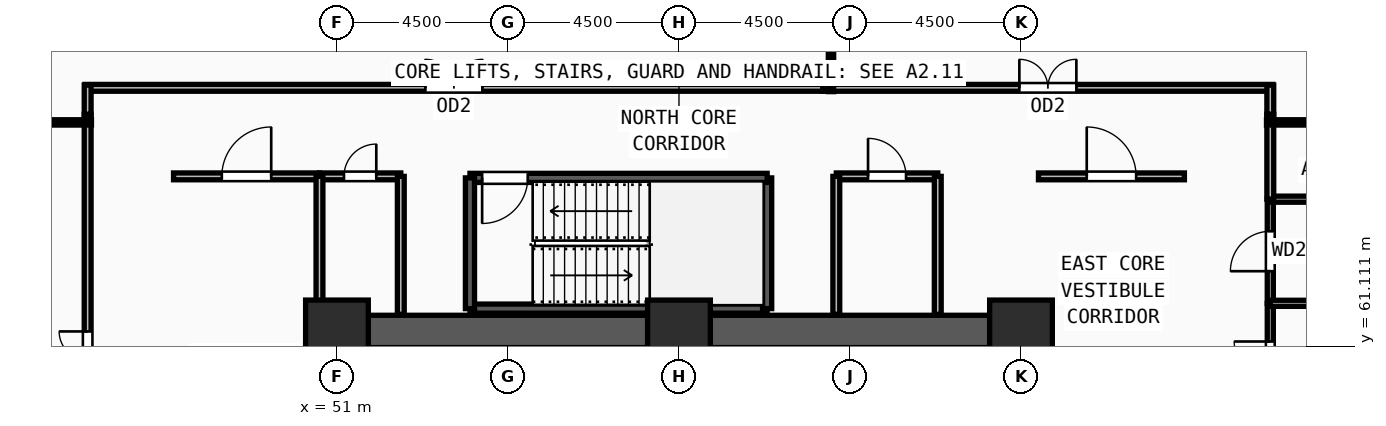
"""IFC4 building model, lengths in metres.
Left out: names, types, materials, properties, quantities, classifications, styles, units other than length and angle.
Written with IfcOpenShell. Run it as: python <this file> out.ifc"""

import sys

from ifc_helpers import new_model, si_unit, direction, frame, frame_2d, origin, origin_2d, place, context, subcontext, project, spatial, rectangle, extrude, source, transform, mapped, element, fill, save


model = new_model("IFC4")
c1 = context("Model", 3, precision=1e-05, world=origin(), true_north=direction((0.0, 1.0)))
c2 = subcontext(c1, "Body", "Model", "MODEL_VIEW")
j1 = project(units=[si_unit("LENGTHUNIT", "METRE"), si_unit("PLANEANGLEUNIT", "RADIAN")], contexts=[c1])
p1 = place(None, origin())
s1 = spatial("IfcSite", under=j1, at=p1, CompositionType="ELEMENT")
p2 = place(p1, origin())
s2 = spatial("IfcBuilding", under=s1, at=p2, CompositionType="ELEMENT")
p3 = place(p2, frame((0.0, 0.0, 63.0)))
s3 = spatial("IfcBuildingStorey", under=s2, at=p3, CompositionType="ELEMENT", Elevation=63.0)
m1 = source(origin(), c2, "Body", "SweptSolid", [
    extrude(rectangle(XDim=1.65, YDim=1.65, at=origin_2d()), origin(), (0.0, 0.0, 1.0), 3.75),
])
for number, where, z_axis, x_axis in (
    (1, (69.0, 61.5, 0.0), (0.0, 0.0, 1.0), (1.0, 0.0, 0.0)),
    (2, (60.0, 61.5, 0.0), (0.0, 0.0, 1.0), (1.0, 0.0, 0.0)),
    (3, (51.0, 61.5, 0.0), (0.0, 0.0, 1.0), (1.0, 0.0, 0.0)),
):
    element("IfcColumn", number, at=place(p3, frame(where, z_axis=z_axis, x_axis=x_axis)), inside=s3, PredefinedType="COLUMN", context=c2, shape_type="MappedRepresentation", body=[
        mapped(m1, transform((0.0, 0.0, 0.0), x_axis=(1.0, 0.0, 0.0), y_axis=(0.0, 1.0, 0.0), z_axis=(0.0, 0.0, 1.0), scale=1.0)),
    ])
for number, where, z_axis, x_axis in (
    (4, (51.825, 61.5, 0.0), (0.0, 0.0, 1.0), (1.0, 0.0, 0.0)),
    (5, (60.825, 61.5, 0.0), (0.0, 0.0, 1.0), (1.0, 0.0, 0.0)),
):
    element("IfcWall", number, at=place(p3, frame(where, z_axis=z_axis, x_axis=x_axis)), inside=s3, PredefinedType="SHEAR", context=c2, shape_type="SweptSolid", body=[
        extrude(rectangle(XDim=7.35, YDim=0.85, at=frame_2d((3.675, 0.0))), origin(), (0.0, 0.0, 1.0), 3.57),
    ])
p4 = place(p3, frame((54.5, 62.1, 0.0), z_axis=(0.0, 0.0, 1.0), x_axis=(1.0, 0.0, 0.0)))
e6 = element("IfcWall", 6, at=p4, inside=s3, PredefinedType="SOLIDWALL", context=c2, shape_type="SweptSolid", body=[
    extrude(rectangle(XDim=7.82, YDim=0.24, at=frame_2d((3.91, 0.0))), origin(), (0.0, 0.0, 1.0), 3.57),
])
p5 = place(p3, frame((62.32, 62.1, 0.0), z_axis=(0.0, 0.0, 1.0), x_axis=(0.0, 1.0, 0.0)))
e7 = element("IfcWall", 7, at=p5, inside=s3, PredefinedType="SOLIDWALL", context=c2, shape_type="SweptSolid", body=[
    extrude(rectangle(XDim=3.44, YDim=0.24, at=frame_2d((1.72, 0.0))), origin(), (0.0, 0.0, 1.0), 3.57),
])
p6 = place(p3, frame((62.32, 65.54, 0.0), z_axis=(0.0, 0.0, 1.0), x_axis=(-1.0, 0.0, 0.0)))
e8 = element("IfcWall", 8, at=p6, inside=s3, PredefinedType="SOLIDWALL", context=c2, shape_type="SweptSolid", body=[
    extrude(rectangle(XDim=7.82, YDim=0.24, at=frame_2d((3.91, 0.0))), origin(), (0.0, 0.0, 1.0), 3.57),
])
m2 = source(origin(), c2, "Body", "SweptSolid", [
    extrude(rectangle(XDim=1.2, YDim=2.2, at=frame_2d((0.6, 1.1))), frame((0.0, 0.13, 0.0), z_axis=(0.0, -1.0, 0.0), x_axis=(1.0, 0.0, 0.0)), (0.0, 0.0, 1.0), 0.26),
])
p7 = place(p6, frame((6.3, 0.0, 0.0)))
e9 = element("IfcOpeningElement", 9, at=p7, cuts=e8, PredefinedType="OPENING", context=c2, shape_type="MappedRepresentation", body=[
    mapped(m2, transform((0.0, 0.0, 0.0), x_axis=(1.0, 0.0, 0.0), y_axis=(0.0, 1.0, 0.0), z_axis=(0.0, 0.0, 1.0), scale=1.0)),
])
p8 = place(p3, frame((54.5, 65.54, 0.0), z_axis=(0.0, 0.0, 1.0), x_axis=(0.0, -1.0, 0.0)))
e10 = element("IfcWall", 10, at=p8, inside=s3, PredefinedType="SOLIDWALL", context=c2, shape_type="SweptSolid", body=[
    extrude(rectangle(XDim=3.44, YDim=0.24, at=frame_2d((1.72, 0.0))), origin(), (0.0, 0.0, 1.0), 3.57),
])
p9 = place(p3, frame((75.56, 59.28, 0.0), z_axis=(0.0, 0.0, 1.0), x_axis=(0.0, 1.0, 0.0)))
e11 = element("IfcWall", 11, at=p9, inside=s3, PredefinedType="PARTITIONING", context=c2, shape_type="SweptSolid", body=[
    extrude(rectangle(XDim=2.96, YDim=0.16, at=frame_2d((1.48, 0.0))), origin(), (0.0, 0.0, 1.0), 3.57),
])
m3 = source(origin(), c2, "Body", "SweptSolid", [
    extrude(rectangle(XDim=0.95, YDim=2.15, at=frame_2d((0.475, 1.075))), frame((0.0, 0.09, 0.0), z_axis=(0.0, -1.0, 0.0), x_axis=(1.0, 0.0, 0.0)), (0.0, 0.0, 1.0), 0.18),
])
p10 = place(p9, frame((1.005, 0.0, 0.0)))
e12 = element("IfcOpeningElement", 12, at=p10, cuts=e11, PredefinedType="OPENING", context=c2, shape_type="MappedRepresentation", body=[
    mapped(m3, transform((0.0, 0.0, 0.0), x_axis=(1.0, 0.0, 0.0), y_axis=(0.0, 1.0, 0.0), z_axis=(0.0, 0.0, 1.0), scale=1.0)),
])
p11 = place(p3, frame((75.56, 62.24, 0.0), z_axis=(0.0, 0.0, 1.0), x_axis=(0.0, 1.0, 0.0)))
e13 = element("IfcWall", 13, at=p11, inside=s3, PredefinedType="PARTITIONING", context=c2, shape_type="SweptSolid", body=[
    extrude(rectangle(XDim=2.74, YDim=0.16, at=frame_2d((1.37, 0.0))), origin(), (0.0, 0.0, 1.0), 3.57),
])
m4 = source(origin(), c2, "Body", "SweptSolid", [
    extrude(rectangle(XDim=1.05, YDim=2.15, at=frame_2d((0.525, 1.075))), frame((0.0, 0.09, 0.0), z_axis=(0.0, -1.0, 0.0), x_axis=(1.0, 0.0, 0.0)), (0.0, 0.0, 1.0), 0.18),
])
p12 = place(p11, frame((0.845, 0.0, 0.0)))
e14 = element("IfcOpeningElement", 14, at=p12, cuts=e13, PredefinedType="OPENING", context=c2, shape_type="MappedRepresentation", body=[
    mapped(m4, transform((0.0, 0.0, 0.0), x_axis=(1.0, 0.0, 0.0), y_axis=(0.0, 1.0, 0.0), z_axis=(0.0, 0.0, 1.0), scale=1.0)),
])
p13 = place(p3, frame((50.54, 65.58, 0.0), z_axis=(0.0, 0.0, 1.0), x_axis=(1.0, 0.0, 0.0)))
e15 = element("IfcWall", 15, at=p13, inside=s3, PredefinedType="PARTITIONING", context=c2, shape_type="SweptSolid", body=[
    extrude(rectangle(XDim=2.14, YDim=0.18, at=frame_2d((1.07, 0.0))), origin(), (0.0, 0.0, 1.0), 3.57),
])
m5 = source(origin(), c2, "Body", "SweptSolid", [
    extrude(rectangle(XDim=0.85, YDim=2.1, at=frame_2d((0.425, 1.05))), frame((0.0, 0.1, 0.0), z_axis=(0.0, -1.0, 0.0), x_axis=(1.0, 0.0, 0.0)), (0.0, 0.0, 1.0), 0.2),
])
p14 = place(p13, frame((0.645, 0.0, 0.0)))
e16 = element("IfcOpeningElement", 16, at=p14, cuts=e15, PredefinedType="OPENING", context=c2, shape_type="MappedRepresentation", body=[
    mapped(m5, transform((0.0, 0.0, 0.0), x_axis=(1.0, 0.0, 0.0), y_axis=(0.0, 1.0, 0.0), z_axis=(0.0, 0.0, 1.0), scale=1.0)),
])
p15 = place(p3, frame((64.14, 65.58, 0.0), z_axis=(0.0, 0.0, 1.0), x_axis=(1.0, 0.0, 0.0)))
e17 = element("IfcWall", 17, at=p15, inside=s3, PredefinedType="PARTITIONING", context=c2, shape_type="SweptSolid", body=[
    extrude(rectangle(XDim=2.67, YDim=0.18, at=frame_2d((1.335, 0.0))), origin(), (0.0, 0.0, 1.0), 3.57),
])
m6 = source(origin(), c2, "Body", "SweptSolid", [
    extrude(rectangle(XDim=1.0, YDim=2.2, at=frame_2d((0.5, 1.1))), frame((0.0, 0.1, 0.0), z_axis=(0.0, -1.0, 0.0), x_axis=(1.0, 0.0, 0.0)), (0.0, 0.0, 1.0), 0.2),
])
p16 = place(p15, frame((0.835, 0.0, 0.0)))
e18 = element("IfcOpeningElement", 18, at=p16, cuts=e17, PredefinedType="OPENING", context=c2, shape_type="MappedRepresentation", body=[
    mapped(m6, transform((0.0, 0.0, 0.0), x_axis=(1.0, 0.0, 0.0), y_axis=(0.0, 1.0, 0.0), z_axis=(0.0, 0.0, 1.0), scale=1.0)),
])
p17 = place(p3, frame((46.7, 65.58, 0.0), z_axis=(0.0, 0.0, 1.0), x_axis=(1.0, 0.0, 0.0)))
e19 = element("IfcWall", 19, at=p17, inside=s3, PredefinedType="PARTITIONING", context=c2, shape_type="SweptSolid", body=[
    extrude(rectangle(XDim=3.84, YDim=0.18, at=frame_2d((1.92, 0.0))), origin(), (0.0, 0.0, 1.0), 3.57),
])
m7 = source(origin(), c2, "Body", "SweptSolid", [
    extrude(rectangle(XDim=1.3, YDim=2.2, at=frame_2d((0.65, 1.1))), frame((0.0, 0.1, 0.0), z_axis=(0.0, -1.0, 0.0), x_axis=(1.0, 0.0, 0.0)), (0.0, 0.0, 1.0), 0.2),
])
p18 = place(p17, frame((1.27, 0.0, 0.0)))
e20 = element("IfcOpeningElement", 20, at=p18, cuts=e19, PredefinedType="OPENING", context=c2, shape_type="MappedRepresentation", body=[
    mapped(m7, transform((0.0, 0.0, 0.0), x_axis=(1.0, 0.0, 0.0), y_axis=(0.0, 1.0, 0.0), z_axis=(0.0, 0.0, 1.0), scale=1.0)),
])
p19 = place(p3, frame((69.46, 65.58, 0.0), z_axis=(0.0, 0.0, 1.0), x_axis=(1.0, 0.0, 0.0)))
e21 = element("IfcWall", 21, at=p19, inside=s3, PredefinedType="PARTITIONING", context=c2, shape_type="SweptSolid", body=[
    extrude(rectangle(XDim=3.84, YDim=0.18, at=frame_2d((1.92, 0.0))), origin(), (0.0, 0.0, 1.0), 3.57),
])
p20 = place(p19, frame((1.27, 0.0, 0.0)))
e22 = element("IfcOpeningElement", 22, at=p20, cuts=e21, PredefinedType="OPENING", context=c2, shape_type="MappedRepresentation", body=[
    mapped(m7, transform((0.0, 0.0, 0.0), x_axis=(1.0, 0.0, 0.0), y_axis=(0.0, 1.0, 0.0), z_axis=(0.0, 0.0, 1.0), scale=1.0)),
])
p21 = place(p3, frame((63.785, 67.91, 0.0), z_axis=(0.0, 0.0, 1.0), x_axis=(1.0, 0.0, 0.0)))
e23 = element("IfcWall", 23, at=p21, inside=s3, PredefinedType="PARTITIONING", context=c2, shape_type="SweptSolid", body=[
    extrude(rectangle(XDim=11.845, YDim=0.18, at=frame_2d((5.922, 0.0))), origin(), (0.0, 0.0, 1.0), 3.57),
])
m8 = source(origin(), c2, "Body", "SweptSolid", [
    extrude(rectangle(XDim=1.5, YDim=2.2, at=frame_2d((0.75, 1.1))), frame((0.0, 0.1, 0.0), z_axis=(0.0, -1.0, 0.0), x_axis=(1.0, 0.0, 0.0)), (0.0, 0.0, 1.0), 0.2),
])
p22 = place(p21, frame((5.172, 0.0, 0.0)))
e24 = element("IfcOpeningElement", 24, at=p22, cuts=e23, PredefinedType="OPENING", context=c2, shape_type="MappedRepresentation", body=[
    mapped(m8, transform((0.0, 0.0, 0.0), x_axis=(1.0, 0.0, 0.0), y_axis=(0.0, 1.0, 0.0), z_axis=(0.0, 0.0, 1.0), scale=1.0)),
])
p23 = place(p3, frame((44.37, 67.91, 0.0), z_axis=(0.0, 0.0, 1.0), x_axis=(1.0, 0.0, 0.0)))
e25 = element("IfcWall", 25, at=p23, inside=s3, PredefinedType="PARTITIONING", context=c2, shape_type="SweptSolid", body=[
    extrude(rectangle(XDim=19.415, YDim=0.18, at=frame_2d((9.708, 0.0))), origin(), (0.0, 0.0, 1.0), 3.57),
])
p24 = place(p23, frame((8.957, 0.0, 0.0)))
e26 = element("IfcOpeningElement", 26, at=p24, cuts=e25, PredefinedType="OPENING", context=c2, shape_type="MappedRepresentation", body=[
    mapped(m8, transform((0.0, 0.0, 0.0), x_axis=(1.0, 0.0, 0.0), y_axis=(0.0, 1.0, 0.0), z_axis=(0.0, 0.0, 1.0), scale=1.0)),
])
p25 = place(p3, frame((44.44, 54.285, 0.0), z_axis=(0.0, 0.0, 1.0), x_axis=(0.0, 1.0, 0.0)))
e27 = element("IfcWall", 27, at=p25, inside=s3, PredefinedType="PARTITIONING", context=c2, shape_type="SweptSolid", body=[
    extrude(rectangle(XDim=12.93, YDim=0.18, at=frame_2d((6.465, 0.0))), origin(), (0.0, 0.0, 1.0), 3.57),
])
p26 = place(p25, frame((5.715, 0.0, 0.0)))
e28 = element("IfcOpeningElement", 28, at=p26, cuts=e27, PredefinedType="OPENING", context=c2, shape_type="MappedRepresentation", body=[
    mapped(m8, transform((0.0, 0.0, 0.0), x_axis=(1.0, 0.0, 0.0), y_axis=(0.0, 1.0, 0.0), z_axis=(0.0, 0.0, 1.0), scale=1.0)),
])
for number, where, z_axis, x_axis in (
    (29, (75.56, 62.24, 0.0), (0.0, 0.0, 1.0), (1.0, 0.0, 0.0)),
    (30, (75.56, 64.98, 0.0), (0.0, 0.0, 1.0), (1.0, 0.0, 0.0)),
):
    element("IfcWall", number, at=place(p3, frame(where, z_axis=z_axis, x_axis=x_axis)), inside=s3, PredefinedType="PARTITIONING", context=c2, shape_type="SweptSolid", body=[
        extrude(rectangle(XDim=4.46, YDim=0.16, at=frame_2d((2.23, 0.0))), origin(), (0.0, 0.0, 1.0), 3.57),
    ])
for number, where, z_axis, x_axis in (
    (31, (50.54, 61.95, 0.0), (0.0, 0.0, 1.0), (0.0, 1.0, 0.0)),
    (32, (52.68, 61.95, 0.0), (0.0, 0.0, 1.0), (0.0, 1.0, 0.0)),
    (33, (64.14, 61.95, 0.0), (0.0, 0.0, 1.0), (0.0, 1.0, 0.0)),
    (34, (66.81, 61.95, 0.0), (0.0, 0.0, 1.0), (0.0, 1.0, 0.0)),
):
    element("IfcWall", number, at=place(p3, frame(where, z_axis=z_axis, x_axis=x_axis)), inside=s3, PredefinedType="PARTITIONING", context=c2, shape_type="SweptSolid", body=[
        extrude(rectangle(XDim=3.63, YDim=0.18, at=frame_2d((1.815, 0.0))), origin(), (0.0, 0.0, 1.0), 3.57),
    ])
p27 = place(p3, frame((75.56, 67.215, 0.0), z_axis=(0.0, 0.0, 1.0), x_axis=(0.0, -1.0, 0.0)))
e35 = element("IfcWall", 35, at=p27, inside=s3, PredefinedType="PARTITIONING", context=c2, shape_type="SweptSolid", body=[
    extrude(rectangle(XDim=2.235, YDim=0.18, at=frame_2d((1.118, 0.0))), origin(), (0.0, 0.0, 1.0), 3.57),
])
for number, where, z_axis, x_axis in (
    (36, (75.56, 67.98, 0.0), (0.0, 0.0, 1.0), (0.0, -1.0, 0.0)),
    (37, (44.44, 67.215, 0.0), (0.0, 0.0, 1.0), (0.0, 1.0, 0.0)),
):
    element("IfcWall", number, at=place(p3, frame(where, z_axis=z_axis, x_axis=x_axis)), inside=s3, PredefinedType="PARTITIONING", context=c2, shape_type="SweptSolid", body=[
        extrude(rectangle(XDim=0.765, YDim=0.18, at=frame_2d((0.382, 0.0))), origin(), (0.0, 0.0, 1.0), 3.57),
    ])
p28 = place(p3, frame((44.54, 67.0, 0.0), z_axis=(0.0, 0.0, 1.0), x_axis=(-1.0, 0.0, 0.0)))
e38 = element("IfcWall", 38, at=p28, inside=s3, PredefinedType="PARTITIONING", context=c2, shape_type="SweptSolid", body=[
    extrude(rectangle(XDim=22.533, YDim=0.14, at=frame_2d((11.267, 0.0))), origin(), (0.0, 0.0, 1.0), 2.655),
])
p29 = place(p3, frame((75.46, 67.0, 0.0), z_axis=(0.0, 0.0, 1.0), x_axis=(1.0, 0.0, 0.0)))
e39 = element("IfcWall", 39, at=p29, inside=s3, PredefinedType="PARTITIONING", context=c2, shape_type="SweptSolid", body=[
    extrude(rectangle(XDim=22.562, YDim=0.14, at=frame_2d((11.281, 0.0))), origin(), (0.0, 0.0, 1.0), 2.655),
])
p30 = place(p3, frame((64.0, 67.81, 0.0), z_axis=(0.0, 0.0, 1.0), x_axis=(0.0, 1.0, 0.0)))
e40 = element("IfcWall", 40, at=p30, inside=s3, PredefinedType="PARTITIONING", context=c2, shape_type="SweptSolid", body=[
    extrude(rectangle(XDim=14.071, YDim=0.14, at=frame_2d((7.036, 0.0))), origin(), (0.0, 0.0, 1.0), 3.57),
])
m9 = source(origin(), c2, "Body", "SweptSolid", [
    extrude(rectangle(XDim=1.2, YDim=2.2, at=frame_2d((0.6, 1.1))), frame((0.0, 0.025, 0.0), z_axis=(0.0, -1.0, 0.0), x_axis=(1.0, 0.0, 0.0)), (0.0, 0.0, 1.0), 0.05),
])
p31 = place(p7, origin())
e41 = element("IfcDoor", 41, at=p31, inside=s3, OperationType="SINGLE_SWING_RIGHT", PredefinedType="DOOR", context=c2, shape_type="MappedRepresentation", body=[
    mapped(m9, transform((0.0, 0.0, 0.0), x_axis=(1.0, 0.0, 0.0), y_axis=(0.0, 1.0, 0.0), z_axis=(0.0, 0.0, 1.0), scale=1.0)),
])
fill(e9, e41)
m10 = source(origin(), c2, "Body", "SweptSolid", [
    extrude(rectangle(XDim=0.95, YDim=2.15, at=frame_2d((0.475, 1.075))), frame((0.0, 0.025, 0.0), z_axis=(0.0, -1.0, 0.0), x_axis=(1.0, 0.0, 0.0)), (0.0, 0.0, 1.0), 0.05),
])
p32 = place(p10, origin())
e42 = element("IfcDoor", 42, at=p32, inside=s3, OperationType="SINGLE_SWING_RIGHT", PredefinedType="DOOR", context=c2, shape_type="MappedRepresentation", body=[
    mapped(m10, transform((0.0, 0.0, 0.0), x_axis=(1.0, 0.0, 0.0), y_axis=(0.0, 1.0, 0.0), z_axis=(0.0, 0.0, 1.0), scale=1.0)),
])
fill(e12, e42)
m11 = source(origin(), c2, "Body", "SweptSolid", [
    extrude(rectangle(XDim=1.05, YDim=2.15, at=frame_2d((0.525, 1.075))), frame((0.0, 0.025, 0.0), z_axis=(0.0, -1.0, 0.0), x_axis=(1.0, 0.0, 0.0)), (0.0, 0.0, 1.0), 0.05),
])
p33 = place(p12, origin())
e43 = element("IfcDoor", 43, at=p33, inside=s3, OperationType="SINGLE_SWING_LEFT", PredefinedType="DOOR", context=c2, shape_type="MappedRepresentation", body=[
    mapped(m11, transform((0.0, 0.0, 0.0), x_axis=(1.0, 0.0, 0.0), y_axis=(0.0, 1.0, 0.0), z_axis=(0.0, 0.0, 1.0), scale=1.0)),
])
fill(e14, e43)
m12 = source(origin(), c2, "Body", "SweptSolid", [
    extrude(rectangle(XDim=0.85, YDim=2.1, at=frame_2d((0.425, 1.05))), frame((0.0, 0.025, 0.0), z_axis=(0.0, -1.0, 0.0), x_axis=(1.0, 0.0, 0.0)), (0.0, 0.0, 1.0), 0.05),
])
p34 = place(p14, origin())
e44 = element("IfcDoor", 44, at=p34, inside=s3, OperationType="SINGLE_SWING_RIGHT", PredefinedType="DOOR", context=c2, shape_type="MappedRepresentation", body=[
    mapped(m12, transform((0.0, 0.0, 0.0), x_axis=(1.0, 0.0, 0.0), y_axis=(0.0, 1.0, 0.0), z_axis=(0.0, 0.0, 1.0), scale=1.0)),
])
fill(e16, e44)
m13 = source(origin(), c2, "Body", "SweptSolid", [
    extrude(rectangle(XDim=1.0, YDim=2.2, at=frame_2d((0.5, 1.1))), frame((0.0, 0.025, 0.0), z_axis=(0.0, -1.0, 0.0), x_axis=(1.0, 0.0, 0.0)), (0.0, 0.0, 1.0), 0.05),
])
p35 = place(p16, origin())
e45 = element("IfcDoor", 45, at=p35, inside=s3, OperationType="SINGLE_SWING_LEFT", PredefinedType="DOOR", context=c2, shape_type="MappedRepresentation", body=[
    mapped(m13, transform((0.0, 0.0, 0.0), x_axis=(1.0, 0.0, 0.0), y_axis=(0.0, 1.0, 0.0), z_axis=(0.0, 0.0, 1.0), scale=1.0)),
])
fill(e18, e45)
m14 = source(origin(), c2, "Body", "SweptSolid", [
    extrude(rectangle(XDim=1.3, YDim=2.2, at=frame_2d((0.65, 1.1))), frame((0.0, 0.025, 0.0), z_axis=(0.0, -1.0, 0.0), x_axis=(1.0, 0.0, 0.0)), (0.0, 0.0, 1.0), 0.05),
])
p36 = place(p18, origin())
e46 = element("IfcDoor", 46, at=p36, inside=s3, OperationType="SINGLE_SWING_RIGHT", PredefinedType="DOOR", context=c2, shape_type="MappedRepresentation", body=[
    mapped(m14, transform((0.0, 0.0, 0.0), x_axis=(1.0, 0.0, 0.0), y_axis=(0.0, 1.0, 0.0), z_axis=(0.0, 0.0, 1.0), scale=1.0)),
])
fill(e20, e46)
p37 = place(p20, origin())
e47 = element("IfcDoor", 47, at=p37, inside=s3, OperationType="SINGLE_SWING_LEFT", PredefinedType="DOOR", context=c2, shape_type="MappedRepresentation", body=[
    mapped(m14, transform((0.0, 0.0, 0.0), x_axis=(1.0, 0.0, 0.0), y_axis=(0.0, 1.0, 0.0), z_axis=(0.0, 0.0, 1.0), scale=1.0)),
])
fill(e22, e47)
m15 = source(origin(), c2, "Body", "SweptSolid", [
    extrude(rectangle(XDim=1.5, YDim=2.2, at=frame_2d((0.75, 1.1))), frame((0.0, 0.025, 0.0), z_axis=(0.0, -1.0, 0.0), x_axis=(1.0, 0.0, 0.0)), (0.0, 0.0, 1.0), 0.05),
])
p38 = place(p22, origin())
e48 = element("IfcDoor", 48, at=p38, inside=s3, OperationType="DOUBLE_DOOR_SINGLE_SWING", PredefinedType="DOOR", context=c2, shape_type="MappedRepresentation", body=[
    mapped(m15, transform((0.0, 0.0, 0.0), x_axis=(1.0, 0.0, 0.0), y_axis=(0.0, 1.0, 0.0), z_axis=(0.0, 0.0, 1.0), scale=1.0)),
])
fill(e24, e48)
p39 = place(p24, origin())
e49 = element("IfcDoor", 49, at=p39, inside=s3, OperationType="DOUBLE_DOOR_SINGLE_SWING", PredefinedType="DOOR", context=c2, shape_type="MappedRepresentation", body=[
    mapped(m15, transform((0.0, 0.0, 0.0), x_axis=(1.0, 0.0, 0.0), y_axis=(0.0, 1.0, 0.0), z_axis=(0.0, 0.0, 1.0), scale=1.0)),
])
fill(e26, e49)
p40 = place(p26, origin())
e50 = element("IfcDoor", 50, at=p40, inside=s3, OperationType="DOUBLE_DOOR_SINGLE_SWING", PredefinedType="DOOR", context=c2, shape_type="MappedRepresentation", body=[
    mapped(m15, transform((0.0, 0.0, 0.0), x_axis=(1.0, 0.0, 0.0), y_axis=(0.0, 1.0, 0.0), z_axis=(0.0, 0.0, 1.0), scale=1.0)),
])
fill(e28, e50)
save(model, sys.argv[1])
